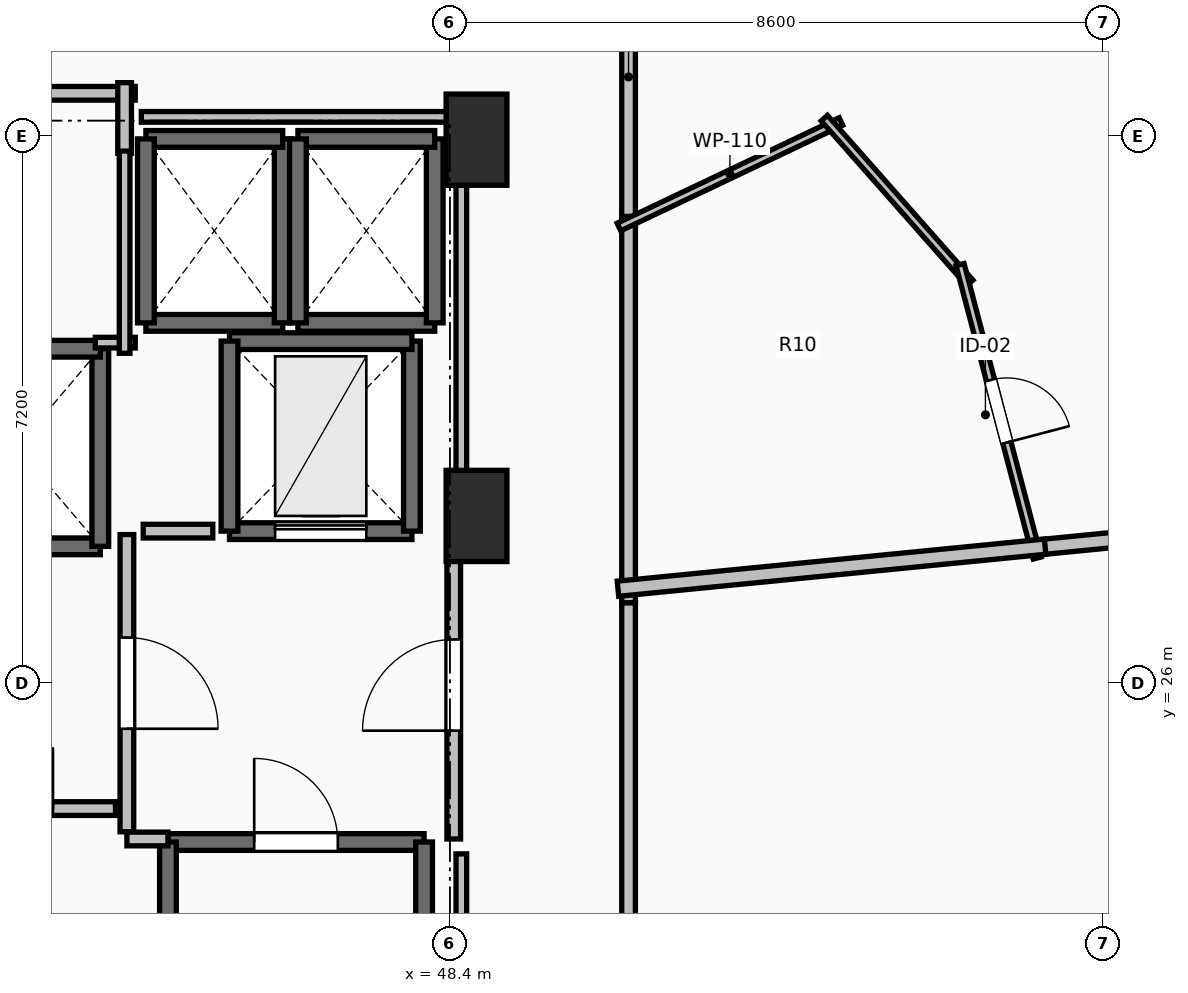
"""IFC4 building model, lengths in metres.
Left out: names, types, materials, properties, quantities, classifications, styles, units other than length and angle.
Written with IfcOpenShell. Run it as: python <this file> out.ifc"""

import sys

from ifc_helpers import new_model, si_unit, direction, frame, frame_2d, origin, origin_2d, place, context, subcontext, project, spatial, rectangle, extrude, element, fill, save


model = new_model("IFC4")
c1 = context("Model", 3, precision=1e-05, world=origin(), true_north=direction((0.0, 1.0)))
c2 = subcontext(c1, "Body", "Model", "MODEL_VIEW")
j1 = project(units=[si_unit("LENGTHUNIT", "METRE"), si_unit("PLANEANGLEUNIT", "RADIAN")], contexts=[c1])
p1 = place(None, origin())
s1 = spatial("IfcSite", under=j1, at=p1, CompositionType="ELEMENT")
p2 = place(p1, origin())
s2 = spatial("IfcBuilding", under=s1, at=p2, CompositionType="ELEMENT")
p3 = place(p2, frame((0.0, 0.0, 55.5)))
s3 = spatial("IfcBuildingStorey", under=s2, at=p3, CompositionType="ELEMENT", Elevation=55.5)
for number, where, z_axis, x_axis in (
    (1, (48.75, 33.15, 0.0), (0.0, 0.0, 1.0), (1.0, 0.0, 0.0)),
    (2, (48.75, 28.2, 0.0), (0.0, 0.0, 1.0), (1.0, 0.0, 0.0)),
):
    element("IfcColumn", number, at=place(p3, frame(where, z_axis=z_axis, x_axis=x_axis)), inside=s3, PredefinedType="PILASTER", context=c2, shape_type="SweptSolid", body=[
        extrude(rectangle(XDim=0.8, YDim=1.2, at=origin_2d()), origin(), (0.0, 0.0, 1.0), 3.5),
    ])
p4 = place(p3, frame((44.69, 23.91, 0.0), z_axis=(0.0, 0.0, 1.0), x_axis=(1.0, 0.0, 0.0)))
e3 = element("IfcWall", 3, at=p4, inside=s3, PredefinedType="SOLIDWALL", context=c2, shape_type="SweptSolid", body=[
    extrude(rectangle(XDim=3.37, YDim=0.22, at=frame_2d((1.685, 0.0))), origin(), (0.0, 0.0, 1.0), 3.24),
])
p5 = place(p4, frame((1.135, 0.0, 0.0)))
e4 = element("IfcOpeningElement", 4, at=p5, cuts=e3, PredefinedType="OPENING", context=c2, shape_type="SweptSolid", body=[
    extrude(rectangle(XDim=1.1, YDim=2.15, at=frame_2d((0.55, 1.075))), frame((0.0, 0.125, 0.0), z_axis=(0.0, -1.0, 0.0), x_axis=(1.0, 0.0, 0.0)), (0.0, 0.0, 1.0), 0.25),
])
for number, where, z_axis, x_axis in (
    (5, (48.06, 23.91, 0.0), (0.0, 0.0, 1.0), (0.0, -1.0, 0.0)),
    (6, (44.69, 16.49, 0.0), (0.0, 0.0, 1.0), (0.0, 1.0, 0.0)),
):
    element("IfcWall", number, at=place(p3, frame(where, z_axis=z_axis, x_axis=x_axis)), inside=s3, PredefinedType="SOLIDWALL", context=c2, shape_type="SweptSolid", body=[
        extrude(rectangle(XDim=7.42, YDim=0.22, at=frame_2d((3.71, 0.0))), origin(), (0.0, 0.0, 1.0), 3.24),
    ])
p6 = place(p3, frame((41.6, 27.8, 0.0), z_axis=(0.0, 0.0, 1.0), x_axis=(1.0, 0.0, 0.0)))
e7 = element("IfcWall", 7, at=p6, inside=s3, PredefinedType="SOLIDWALL", context=c2, shape_type="SweptSolid", body=[
    extrude(rectangle(XDim=2.2, YDim=0.22, at=frame_2d((1.1, 0.0))), origin(), (0.0, 0.0, 1.0), 3.24),
])
p7 = place(p3, frame((43.8, 27.8, 0.0), z_axis=(0.0, 0.0, 1.0), x_axis=(0.0, 1.0, 0.0)))
e8 = element("IfcWall", 8, at=p7, inside=s3, PredefinedType="SOLIDWALL", context=c2, shape_type="SweptSolid", body=[
    extrude(rectangle(XDim=2.6, YDim=0.22, at=frame_2d((1.3, 0.0))), origin(), (0.0, 0.0, 1.0), 3.24),
])
p8 = place(p3, frame((43.8, 30.4, 0.0), z_axis=(0.0, 0.0, 1.0), x_axis=(-1.0, 0.0, 0.0)))
e9 = element("IfcWall", 9, at=p8, inside=s3, PredefinedType="SOLIDWALL", context=c2, shape_type="SweptSolid", body=[
    extrude(rectangle(XDim=2.2, YDim=0.22, at=frame_2d((1.1, 0.0))), origin(), (0.0, 0.0, 1.0), 3.24),
])
p9 = place(p3, frame((44.4, 30.74, 0.0), z_axis=(0.0, 0.0, 1.0), x_axis=(1.0, 0.0, 0.0)))
e10 = element("IfcWall", 10, at=p9, inside=s3, PredefinedType="SOLIDWALL", context=c2, shape_type="SweptSolid", body=[
    extrude(rectangle(XDim=1.8, YDim=0.22, at=frame_2d((0.9, 0.0))), origin(), (0.0, 0.0, 1.0), 3.24),
])
p10 = place(p3, frame((46.2, 30.74, 0.0), z_axis=(0.0, 0.0, 1.0), x_axis=(0.0, 1.0, 0.0)))
e11 = element("IfcWall", 11, at=p10, inside=s3, PredefinedType="SOLIDWALL", context=c2, shape_type="SweptSolid", body=[
    extrude(rectangle(XDim=2.42, YDim=0.22, at=frame_2d((1.21, 0.0))), origin(), (0.0, 0.0, 1.0), 3.24),
])
p11 = place(p3, frame((46.2, 33.16, 0.0), z_axis=(0.0, 0.0, 1.0), x_axis=(-1.0, 0.0, 0.0)))
e12 = element("IfcWall", 12, at=p11, inside=s3, PredefinedType="SOLIDWALL", context=c2, shape_type="SweptSolid", body=[
    extrude(rectangle(XDim=1.8, YDim=0.22, at=frame_2d((0.9, 0.0))), origin(), (0.0, 0.0, 1.0), 3.24),
])
p12 = place(p3, frame((44.4, 33.16, 0.0), z_axis=(0.0, 0.0, 1.0), x_axis=(0.0, -1.0, 0.0)))
e13 = element("IfcWall", 13, at=p12, inside=s3, PredefinedType="SOLIDWALL", context=c2, shape_type="SweptSolid", body=[
    extrude(rectangle(XDim=2.42, YDim=0.22, at=frame_2d((1.21, 0.0))), origin(), (0.0, 0.0, 1.0), 3.24),
])
p13 = place(p3, frame((46.4, 30.74, 0.0), z_axis=(0.0, 0.0, 1.0), x_axis=(1.0, 0.0, 0.0)))
e14 = element("IfcWall", 14, at=p13, inside=s3, PredefinedType="SOLIDWALL", context=c2, shape_type="SweptSolid", body=[
    extrude(rectangle(XDim=1.8, YDim=0.22, at=frame_2d((0.9, 0.0))), origin(), (0.0, 0.0, 1.0), 3.24),
])
p14 = place(p3, frame((48.2, 30.74, 0.0), z_axis=(0.0, 0.0, 1.0), x_axis=(0.0, 1.0, 0.0)))
e15 = element("IfcWall", 15, at=p14, inside=s3, PredefinedType="SOLIDWALL", context=c2, shape_type="SweptSolid", body=[
    extrude(rectangle(XDim=2.42, YDim=0.22, at=frame_2d((1.21, 0.0))), origin(), (0.0, 0.0, 1.0), 3.24),
])
p15 = place(p3, frame((48.2, 33.16, 0.0), z_axis=(0.0, 0.0, 1.0), x_axis=(-1.0, 0.0, 0.0)))
e16 = element("IfcWall", 16, at=p15, inside=s3, PredefinedType="SOLIDWALL", context=c2, shape_type="SweptSolid", body=[
    extrude(rectangle(XDim=1.8, YDim=0.22, at=frame_2d((0.9, 0.0))), origin(), (0.0, 0.0, 1.0), 3.24),
])
p16 = place(p3, frame((46.4, 33.16, 0.0), z_axis=(0.0, 0.0, 1.0), x_axis=(0.0, -1.0, 0.0)))
e17 = element("IfcWall", 17, at=p16, inside=s3, PredefinedType="SOLIDWALL", context=c2, shape_type="SweptSolid", body=[
    extrude(rectangle(XDim=2.42, YDim=0.22, at=frame_2d((1.21, 0.0))), origin(), (0.0, 0.0, 1.0), 3.24),
])
p17 = place(p3, frame((45.5, 28.0, 0.0), z_axis=(0.0, 0.0, 1.0), x_axis=(1.0, 0.0, 0.0)))
e18 = element("IfcWall", 18, at=p17, inside=s3, PredefinedType="SHEAR", context=c2, shape_type="SweptSolid", body=[
    extrude(rectangle(XDim=2.4, YDim=0.22, at=frame_2d((1.2, 0.0))), origin(), (0.0, 0.0, 1.0), 3.24),
])
p18 = place(p17, frame((0.6, 0.0, 0.0)))
e19 = element("IfcOpeningElement", 19, at=p18, cuts=e18, PredefinedType="OPENING", context=c2, shape_type="SweptSolid", body=[
    extrude(rectangle(XDim=1.2, YDim=2.2, at=frame_2d((0.6, 1.1))), frame((0.0, 0.125, 0.0), z_axis=(0.0, -1.0, 0.0), x_axis=(1.0, 0.0, 0.0)), (0.0, 0.0, 1.0), 0.25),
])
p19 = place(p3, frame((47.9, 28.0, 0.0), z_axis=(0.0, 0.0, 1.0), x_axis=(0.0, 1.0, 0.0)))
e20 = element("IfcWall", 20, at=p19, inside=s3, PredefinedType="SHEAR", context=c2, shape_type="SweptSolid", body=[
    extrude(rectangle(XDim=2.5, YDim=0.22, at=frame_2d((1.25, 0.0))), origin(), (0.0, 0.0, 1.0), 3.24),
])
p20 = place(p3, frame((47.9, 30.5, 0.0), z_axis=(0.0, 0.0, 1.0), x_axis=(-1.0, 0.0, 0.0)))
e21 = element("IfcWall", 21, at=p20, inside=s3, PredefinedType="SHEAR", context=c2, shape_type="SweptSolid", body=[
    extrude(rectangle(XDim=2.4, YDim=0.22, at=frame_2d((1.2, 0.0))), origin(), (0.0, 0.0, 1.0), 3.24),
])
p21 = place(p3, frame((45.5, 30.5, 0.0), z_axis=(0.0, 0.0, 1.0), x_axis=(0.0, -1.0, 0.0)))
e22 = element("IfcWall", 22, at=p21, inside=s3, PredefinedType="SHEAR", context=c2, shape_type="SweptSolid", body=[
    extrude(rectangle(XDim=2.5, YDim=0.22, at=frame_2d((1.25, 0.0))), origin(), (0.0, 0.0, 1.0), 3.24),
])
p22 = place(p3, frame((44.15, 27.955, 0.0), z_axis=(0.0, 0.0, 1.0), x_axis=(0.0, -1.0, 0.0)))
e23 = element("IfcWall", 23, at=p22, inside=s3, PredefinedType="PARTITIONING", context=c2, shape_type="SweptSolid", body=[
    extrude(rectangle(XDim=3.91, YDim=0.18, at=frame_2d((1.955, 0.0))), origin(), (0.0, 0.0, 1.0), 3.24),
])
p23 = place(p22, frame((1.355, 0.0, 0.0)))
e24 = element("IfcOpeningElement", 24, at=p23, cuts=e23, PredefinedType="OPENING", context=c2, shape_type="SweptSolid", body=[
    extrude(rectangle(XDim=1.2, YDim=2.15, at=frame_2d((0.6, 1.075))), frame((0.0, 0.105, 0.0), z_axis=(0.0, -1.0, 0.0), x_axis=(1.0, 0.0, 0.0)), (0.0, 0.0, 1.0), 0.21),
])
p24 = place(p3, frame((44.15, 23.95, 0.0), z_axis=(0.0, 0.0, 1.0), x_axis=(1.0, 0.0, 0.0)))
e25 = element("IfcWall", 25, at=p24, inside=s3, PredefinedType="PARTITIONING", context=c2, shape_type="SweptSolid", body=[
    extrude(rectangle(XDim=0.54, YDim=0.18, at=frame_2d((0.27, 0.0))), origin(), (0.0, 0.0, 1.0), 3.24),
])
p25 = place(p3, frame((48.45, 23.95, 0.0), z_axis=(0.0, 0.0, 1.0), x_axis=(0.0, 1.0, 0.0)))
e26 = element("IfcWall", 26, at=p25, inside=s3, PredefinedType="PARTITIONING", context=c2, shape_type="SweptSolid", body=[
    extrude(rectangle(XDim=4.05, YDim=0.18, at=frame_2d((2.025, 0.0))), origin(), (0.0, 0.0, 1.0), 3.24),
])
p26 = place(p25, frame((1.425, 0.0, 0.0)))
e27 = element("IfcOpeningElement", 27, at=p26, cuts=e26, PredefinedType="OPENING", context=c2, shape_type="SweptSolid", body=[
    extrude(rectangle(XDim=1.2, YDim=2.15, at=frame_2d((0.6, 1.075))), frame((0.0, 0.105, 0.0), z_axis=(0.0, -1.0, 0.0), x_axis=(1.0, 0.0, 0.0)), (0.0, 0.0, 1.0), 0.21),
])
p27 = place(p3, frame((41.555, 24.35, 0.0), z_axis=(0.0, 0.0, 1.0), x_axis=(1.0, 0.0, 0.0)))
e28 = element("IfcWall", 28, at=p27, inside=s3, PredefinedType="PARTITIONING", context=c2, shape_type="SweptSolid", body=[
    extrude(rectangle(XDim=2.445, YDim=0.18, at=frame_2d((1.223, 0.0))), origin(), (0.0, 0.0, 1.0), 3.24),
])
p28 = place(p27, frame((0.823, 0.0, 0.0)))
e29 = element("IfcOpeningElement", 29, at=p28, cuts=e28, PredefinedType="OPENING", context=c2, shape_type="SweptSolid", body=[
    extrude(rectangle(XDim=0.8, YDim=2.05, at=frame_2d((0.4, 1.025))), frame((0.0, 0.105, 0.0), z_axis=(0.0, -1.0, 0.0), x_axis=(1.0, 0.0, 0.0)), (0.0, 0.0, 1.0), 0.21),
])
p29 = place(p3, frame((44.26, 33.76, 0.0), z_axis=(0.0, 0.0, 1.0), x_axis=(-1.0, 0.0, 0.0)))
e30 = element("IfcWall", 30, at=p29, inside=s3, PredefinedType="PARTITIONING", context=c2, shape_type="SweptSolid", body=[
    extrude(rectangle(XDim=3.36, YDim=0.18, at=frame_2d((1.68, 0.0))), origin(), (0.0, 0.0, 1.0), 3.24),
])
p30 = place(p29, frame((1.255, 0.0, 0.0)))
e31 = element("IfcOpeningElement", 31, at=p30, cuts=e30, PredefinedType="OPENING", context=c2, shape_type="SweptSolid", body=[
    extrude(rectangle(XDim=0.85, YDim=2.1, at=frame_2d((0.425, 1.05))), frame((0.0, 0.105, 0.0), z_axis=(0.0, -1.0, 0.0), x_axis=(1.0, 0.0, 0.0)), (0.0, 0.0, 1.0), 0.21),
])
p31 = place(p3, frame((44.12, 32.97, 0.0), z_axis=(0.0, 0.0, 1.0), x_axis=(0.0, 1.0, 0.0)))
e32 = element("IfcWall", 32, at=p31, inside=s3, PredefinedType="PARTITIONING", context=c2, shape_type="SweptSolid", body=[
    extrude(rectangle(XDim=0.93, YDim=0.18, at=frame_2d((0.465, 0.0))), origin(), (0.0, 0.0, 1.0), 3.24),
])
p32 = place(p3, frame((50.75, 32.001, 0.0), z_axis=(0.0, 0.0, 1.0), x_axis=(0.0, 1.0, 0.0)))
e33 = element("IfcWall", 33, at=p32, inside=s3, PredefinedType="PARTITIONING", context=c2, shape_type="SweptSolid", body=[
    extrude(rectangle(XDim=3.949, YDim=0.18, at=frame_2d((1.975, 0.0))), origin(), (0.0, 0.0, 1.0), 2.432),
])
p33 = place(p3, frame((50.75, 27.056, 0.0), z_axis=(0.0, 0.0, 1.0), x_axis=(0.0, 1.0, 0.0)))
e34 = element("IfcWall", 34, at=p33, inside=s3, PredefinedType="PARTITIONING", context=c2, shape_type="SweptSolid", body=[
    extrude(rectangle(XDim=5.085, YDim=0.18, at=frame_2d((2.542, 0.0))), origin(), (0.0, 0.0, 1.0), 2.432),
])
p34 = place(p3, frame((50.75, 15.596, 0.0), z_axis=(0.0, 0.0, 1.0), x_axis=(0.0, 1.0, 0.0)))
e35 = element("IfcWall", 35, at=p34, inside=s3, PredefinedType="PARTITIONING", context=c2, shape_type="SweptSolid", body=[
    extrude(rectangle(XDim=11.46, YDim=0.18, at=frame_2d((5.73, 0.0))), origin(), (0.0, 0.0, 1.0), 2.432),
])
p35 = place(p34, frame((5.23, 0.0, 0.0)))
e36 = element("IfcOpeningElement", 36, at=p35, cuts=e35, PredefinedType="OPENING", context=c2, shape_type="SweptSolid", body=[
    extrude(rectangle(XDim=1.0, YDim=2.15, at=frame_2d((0.5, 1.075))), frame((0.0, 0.105, 0.0), z_axis=(0.0, -1.0, 0.0), x_axis=(1.0, 0.0, 0.0)), (0.0, 0.0, 1.0), 0.21),
])
p36 = place(p3, frame((50.624, 32.001, 0.0), z_axis=(0.0, 0.0, 1.0), x_axis=(0.903186785932, 0.429247748647, 0.0)))
e37 = element("IfcWall", 37, at=p36, inside=s3, PredefinedType="PARTITIONING", context=c2, shape_type="SweptSolid", body=[
    extrude(rectangle(XDim=3.234, YDim=0.11, at=frame_2d((1.617, 0.0))), origin(), (0.0, 0.0, 1.0), 2.432),
])
p37 = place(p3, frame((53.325, 33.434, 0.0), z_axis=(0.0, 0.0, 1.0), x_axis=(0.661981720099, -0.749519981224, 0.0)))
e38 = element("IfcWall", 38, at=p37, inside=s3, PredefinedType="PARTITIONING", context=c2, shape_type="SweptSolid", body=[
    extrude(rectangle(XDim=2.892, YDim=0.11, at=frame_2d((1.446, 0.0))), origin(), (0.0, 0.0, 1.0), 2.432),
])
p38 = place(p3, frame((55.111, 31.506, 0.0), z_axis=(0.0, 0.0, 1.0), x_axis=(0.254405980461, -0.967097511684, 0.0)))
e39 = element("IfcWall", 39, at=p38, inside=s3, PredefinedType="PARTITIONING", context=c2, shape_type="SweptSolid", body=[
    extrude(rectangle(XDim=3.991, YDim=0.11, at=frame_2d((1.996, 0.0))), origin(), (0.0, 0.0, 1.0), 3.24),
])
p39 = place(p38, frame((1.571, 0.0, 0.0)))
e40 = element("IfcOpeningElement", 40, at=p39, cuts=e39, PredefinedType="OPENING", context=c2, shape_type="SweptSolid", body=[
    extrude(rectangle(XDim=0.85, YDim=2.1, at=frame_2d((0.425, 1.05))), frame((0.0, 0.07, 0.0), z_axis=(0.0, -1.0, 0.0), x_axis=(1.0, 0.0, 0.0)), (0.0, 0.0, 1.0), 0.14),
])
p40 = place(p3, frame((56.091, 27.782, 0.0), z_axis=(0.0, 0.0, 1.0), x_axis=(0.995181539585, 0.098049493977, 0.0)))
e41 = element("IfcWall", 41, at=p40, inside=s3, PredefinedType="PARTITIONING", context=c2, shape_type="SweptSolid", body=[
    extrude(rectangle(XDim=11.138, YDim=0.2, at=frame_2d((5.569, 0.0))), origin(), (0.0, 0.0, 1.0), 2.624),
])
p41 = place(p3, frame((50.611, 27.242, 0.0), z_axis=(0.0, 0.0, 1.0), x_axis=(0.995185043486, 0.098013923607, 0.0)))
e42 = element("IfcWall", 42, at=p41, inside=s3, PredefinedType="PARTITIONING", context=c2, shape_type="SweptSolid", body=[
    extrude(rectangle(XDim=5.647, YDim=0.2, at=frame_2d((2.823, 0.0))), origin(), (0.0, 0.0, 1.0), 2.432),
])
p42 = place(p3, frame((45.28, 28.0, 0.0), z_axis=(0.0, 0.0, 1.0), x_axis=(-1.0, 0.0, 0.0)))
e43 = element("IfcWall", 43, at=p42, inside=s3, PredefinedType="PARTITIONING", context=c2, shape_type="SweptSolid", body=[
    extrude(rectangle(XDim=0.915, YDim=0.18, at=frame_2d((0.458, 0.0))), origin(), (0.0, 0.0, 1.0), 3.24),
])
p43 = place(p3, frame((43.735, 30.48, 0.0), z_axis=(0.0, 0.0, 1.0), x_axis=(1.0, 0.0, 0.0)))
e44 = element("IfcWall", 44, at=p43, inside=s3, PredefinedType="PARTITIONING", context=c2, shape_type="SweptSolid", body=[
    extrude(rectangle(XDim=0.525, YDim=0.14, at=frame_2d((0.262, 0.0))), origin(), (0.0, 0.0, 1.0), 3.24),
])
p44 = place(p3, frame((44.12, 30.34, 0.0), z_axis=(0.0, 0.0, 1.0), x_axis=(0.0, 1.0, 0.0)))
e45 = element("IfcWall", 45, at=p44, inside=s3, PredefinedType="PARTITIONING", context=c2, shape_type="SweptSolid", body=[
    extrude(rectangle(XDim=2.66, YDim=0.14, at=frame_2d((1.33, 0.0))), origin(), (0.0, 0.0, 1.0), 3.24),
])
p45 = place(p3, frame((44.34, 33.45, 0.0), z_axis=(0.0, 0.0, 1.0), x_axis=(1.0, 0.0, 0.0)))
e46 = element("IfcWall", 46, at=p45, inside=s3, PredefinedType="PARTITIONING", context=c2, shape_type="SweptSolid", body=[
    extrude(rectangle(XDim=4.21, YDim=0.14, at=frame_2d((2.105, 0.0))), origin(), (0.0, 0.0, 1.0), 2.432),
])
p46 = place(p3, frame((48.55, 33.45, 0.0), z_axis=(0.0, 0.0, 1.0), x_axis=(0.0, -1.0, 0.0)))
e47 = element("IfcWall", 47, at=p46, inside=s3, PredefinedType="PARTITIONING", context=c2, shape_type="SweptSolid", body=[
    extrude(rectangle(XDim=5.254, YDim=0.14, at=frame_2d((2.627, 0.0))), origin(), (0.0, 0.0, 1.0), 2.432),
])
p47 = place(p3, frame((48.55, 23.754, 0.0), z_axis=(0.0, 0.0, 1.0), x_axis=(0.0, -1.0, 0.0)))
e48 = element("IfcWall", 48, at=p47, inside=s3, PredefinedType="PARTITIONING", context=c2, shape_type="SweptSolid", body=[
    extrude(rectangle(XDim=7.514, YDim=0.14, at=frame_2d((3.757, 0.0))), origin(), (0.0, 0.0, 1.0), 2.432),
])
p48 = place(p5, origin())
e49 = element("IfcDoor", 49, at=p48, inside=s3, OperationType="SINGLE_SWING_LEFT", PredefinedType="DOOR", context=c2, shape_type="SweptSolid", body=[
    extrude(rectangle(XDim=1.1, YDim=2.15, at=frame_2d((0.55, 1.075))), frame((0.0, 0.025, 0.0), z_axis=(0.0, -1.0, 0.0), x_axis=(1.0, 0.0, 0.0)), (0.0, 0.0, 1.0), 0.05),
])
fill(e4, e49)
p49 = place(p18, origin())
e50 = element("IfcDoor", 50, at=p49, inside=s3, OperationType="SLIDING_TO_LEFT", PredefinedType="DOOR", context=c2, shape_type="SweptSolid", body=[
    extrude(rectangle(XDim=1.2, YDim=2.2, at=frame_2d((0.6, 1.1))), frame((0.0, 0.025, 0.0), z_axis=(0.0, -1.0, 0.0), x_axis=(1.0, 0.0, 0.0)), (0.0, 0.0, 1.0), 0.05),
])
fill(e19, e50)
p50 = place(p23, origin())
e51 = element("IfcDoor", 51, at=p50, inside=s3, OperationType="SINGLE_SWING_RIGHT", PredefinedType="DOOR", context=c2, shape_type="SweptSolid", body=[
    extrude(rectangle(XDim=1.2, YDim=2.15, at=frame_2d((0.6, 1.075))), frame((0.0, 0.025, 0.0), z_axis=(0.0, -1.0, 0.0), x_axis=(1.0, 0.0, 0.0)), (0.0, 0.0, 1.0), 0.05),
])
fill(e24, e51)
p51 = place(p26, origin())
e52 = element("IfcDoor", 52, at=p51, inside=s3, OperationType="SINGLE_SWING_LEFT", PredefinedType="DOOR", context=c2, shape_type="SweptSolid", body=[
    extrude(rectangle(XDim=1.2, YDim=2.15, at=frame_2d((0.6, 1.075))), frame((0.0, 0.025, 0.0), z_axis=(0.0, -1.0, 0.0), x_axis=(1.0, 0.0, 0.0)), (0.0, 0.0, 1.0), 0.05),
])
fill(e27, e52)
p52 = place(p28, origin())
e53 = element("IfcDoor", 53, at=p52, inside=s3, OperationType="SINGLE_SWING_RIGHT", PredefinedType="DOOR", context=c2, shape_type="SweptSolid", body=[
    extrude(rectangle(XDim=0.8, YDim=2.05, at=frame_2d((0.4, 1.025))), frame((0.0, 0.025, 0.0), z_axis=(0.0, -1.0, 0.0), x_axis=(1.0, 0.0, 0.0)), (0.0, 0.0, 1.0), 0.05),
])
fill(e29, e53)
p53 = place(p39, origin())
e54 = element("IfcDoor", 54, at=p53, inside=s3, OperationType="SINGLE_SWING_RIGHT", PredefinedType="DOOR", context=c2, shape_type="SweptSolid", body=[
    extrude(rectangle(XDim=0.85, YDim=2.1, at=frame_2d((0.425, 1.05))), frame((0.0, 0.025, 0.0), z_axis=(0.0, -1.0, 0.0), x_axis=(1.0, 0.0, 0.0)), (0.0, 0.0, 1.0), 0.05),
])
fill(e40, e54)
save(model, sys.argv[1])
